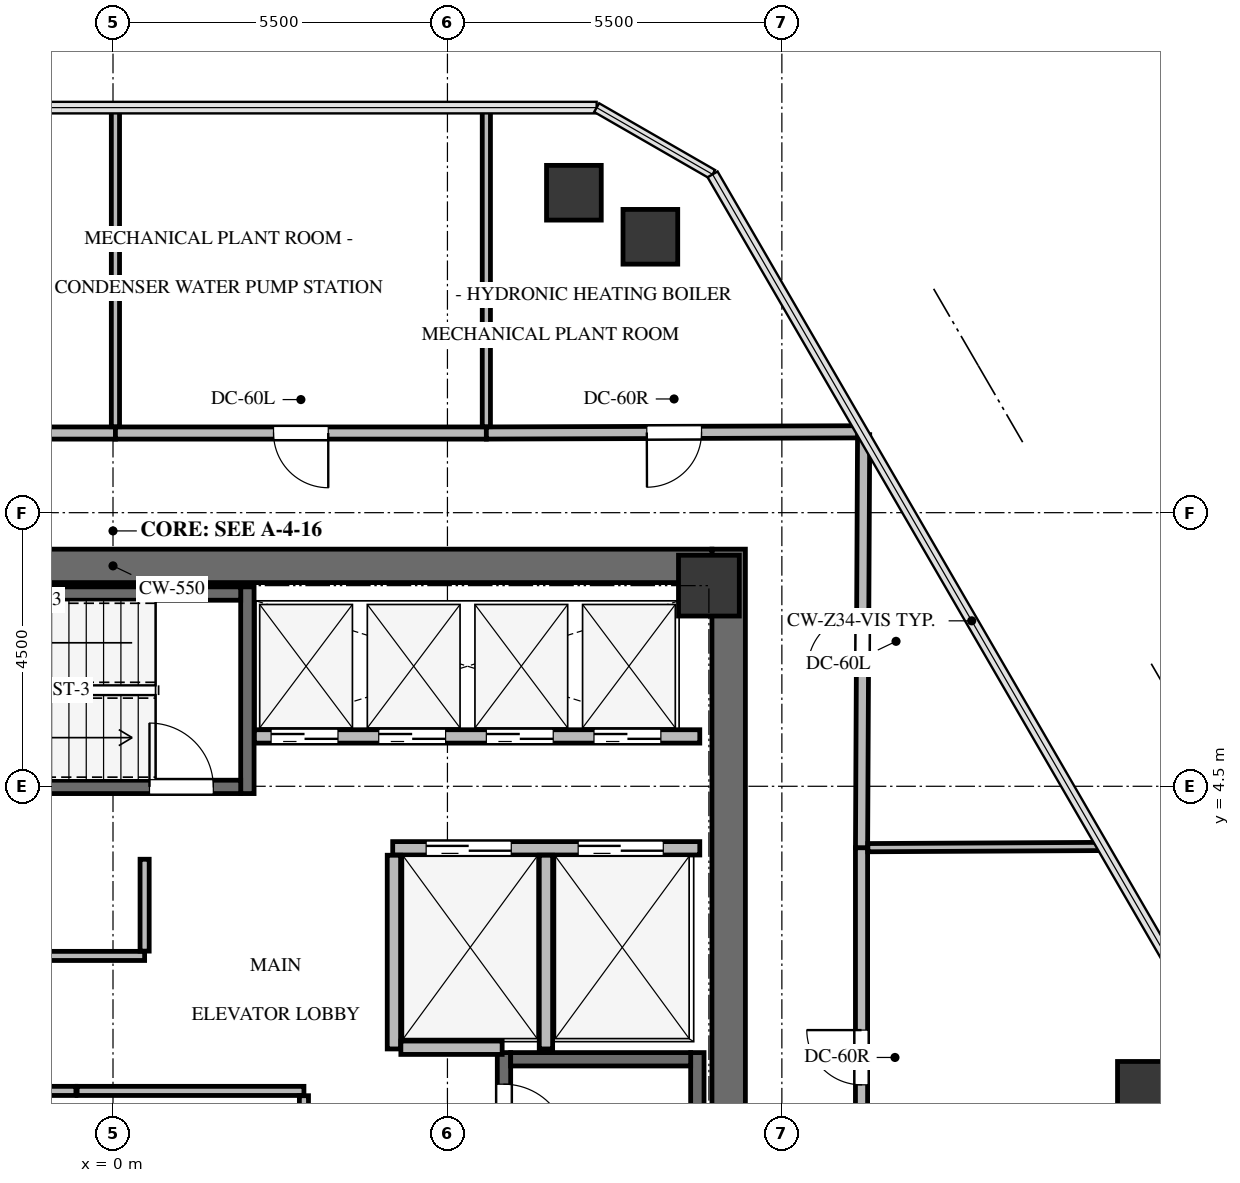
"""IFC4 building model, lengths in metres.
Left out: names, types, materials, properties, quantities, classifications, styles, units other than length and angle.
Written with IfcOpenShell. Run it as: python <this file> out.ifc"""

import sys

from ifc_helpers import new_model, si_unit, direction, frame, frame_2d, origin, origin_2d, place, context, subcontext, project, spatial, rectangle, extrude, source, transform, mapped, element, fill, save


model = new_model("IFC4")
c1 = context("Model", 3, precision=1e-05, world=origin(), true_north=direction((0.0, 1.0)))
c2 = subcontext(c1, "Body", "Model", "MODEL_VIEW")
j1 = project(units=[si_unit("LENGTHUNIT", "METRE"), si_unit("PLANEANGLEUNIT", "RADIAN")], contexts=[c1])
p1 = place(None, origin())
s1 = spatial("IfcSite", under=j1, at=p1, CompositionType="ELEMENT")
p2 = place(p1, origin())
s2 = spatial("IfcBuilding", under=s1, at=p2, CompositionType="ELEMENT")
p3 = place(p2, frame((0.0, 0.0, 264.9)))
s3 = spatial("IfcBuildingStorey", under=s2, at=p3, CompositionType="ELEMENT", Elevation=264.9)
p4 = place(p3, frame((10.125, -8.4, 0.0), z_axis=(0.0, 0.0, 1.0), x_axis=(0.0, 1.0, 0.0)))
e1 = element("IfcWall", 1, at=p4, inside=s3, PredefinedType="SHEAR", context=c2, shape_type="SweptSolid", body=[
    extrude(rectangle(XDim=16.8, YDim=0.55, at=frame_2d((8.4, 0.0))), origin(), (0.0, 0.0, 1.0), 3.4),
])
p5 = place(p3, frame((-9.85, 8.125, 0.0), z_axis=(0.0, 0.0, 1.0), x_axis=(1.0, 0.0, 0.0)))
e2 = element("IfcWall", 2, at=p5, inside=s3, PredefinedType="SHEAR", context=c2, shape_type="SweptSolid", body=[
    extrude(rectangle(XDim=19.7, YDim=0.55, at=frame_2d((9.85, 0.0))), origin(), (0.0, 0.0, 1.0), 3.4),
])
p6 = place(p3, frame((9.61, -7.77, -0.3), z_axis=(0.0, 0.0, 1.0), x_axis=(0.0, 1.0, 0.0)))
e3 = element("IfcWall", 3, at=p6, inside=s3, PredefinedType="SHEAR", context=c2, shape_type="SweptSolid", body=[
    extrude(rectangle(XDim=7.89, YDim=0.22, at=frame_2d((3.945, 0.0))), origin(), (0.0, 0.0, 1.0), 3.4),
])
p7 = place(p3, frame((6.43, 0.12, -0.3), z_axis=(0.0, 0.0, 1.0), x_axis=(0.0, -1.0, 0.0)))
e4 = element("IfcWall", 4, at=p7, inside=s3, PredefinedType="SHEAR", context=c2, shape_type="SweptSolid", body=[
    extrude(rectangle(XDim=7.89, YDim=0.22, at=frame_2d((3.945, 0.0))), origin(), (0.0, 0.0, 1.0), 3.4),
])
p8 = place(p7, frame((0.52, 0.0, 0.0)))
e5 = element("IfcOpeningElement", 5, at=p8, cuts=e4, PredefinedType="OPENING", context=c2, shape_type="SweptSolid", body=[
    extrude(rectangle(XDim=1.05, YDim=2.15, at=frame_2d((0.525, 1.075))), frame((0.0, 0.12, 0.0), z_axis=(0.0, -1.0, 0.0), x_axis=(1.0, 0.0, 0.0)), (0.0, 0.0, 1.0), 0.24),
])
p9 = place(p3, frame((9.5, 0.01, -0.3), z_axis=(0.0, 0.0, 1.0), x_axis=(-1.0, 0.0, 0.0)))
e6 = element("IfcWall", 6, at=p9, inside=s3, PredefinedType="SHEAR", context=c2, shape_type="SweptSolid", body=[
    extrude(rectangle(XDim=2.96, YDim=0.22, at=frame_2d((1.48, 0.0))), origin(), (0.0, 0.0, 1.0), 3.4),
])
p10 = place(p3, frame((2.21, 4.38, -0.3), z_axis=(0.0, 0.0, 1.0), x_axis=(0.0, 1.0, 0.0)))
e7 = element("IfcWall", 7, at=p10, inside=s3, PredefinedType="SHEAR", context=c2, shape_type="SweptSolid", body=[
    extrude(rectangle(XDim=3.4, YDim=0.22, at=frame_2d((1.7, 0.0))), origin(), (0.0, 0.0, 1.0), 3.4),
])
p11 = place(p3, frame((-5.25, 4.49, -0.3), z_axis=(0.0, 0.0, 1.0), x_axis=(1.0, 0.0, 0.0)))
e8 = element("IfcWall", 8, at=p11, inside=s3, PredefinedType="SHEAR", context=c2, shape_type="SweptSolid", body=[
    extrude(rectangle(XDim=7.35, YDim=0.22, at=frame_2d((3.675, 0.0))), origin(), (0.0, 0.0, 1.0), 3.4),
])
p12 = place(p11, frame((5.85, 0.0, 0.0)))
e9 = element("IfcOpeningElement", 9, at=p12, cuts=e8, PredefinedType="OPENING", context=c2, shape_type="SweptSolid", body=[
    extrude(rectangle(XDim=1.05, YDim=2.15, at=frame_2d((0.525, 1.075))), frame((0.0, 0.12, 0.0), z_axis=(0.0, -1.0, 0.0), x_axis=(1.0, 0.0, 0.0)), (0.0, 0.0, 1.0), 0.24),
])
p13 = place(p3, frame((2.1, 7.67, -0.3), z_axis=(0.0, 0.0, 1.0), x_axis=(-1.0, 0.0, 0.0)))
e10 = element("IfcWall", 10, at=p13, inside=s3, PredefinedType="SHEAR", context=c2, shape_type="SweptSolid", body=[
    extrude(rectangle(XDim=7.35, YDim=0.22, at=frame_2d((3.675, 0.0))), origin(), (0.0, 0.0, 1.0), 3.4),
])
m1 = source(origin(), c2, "Body", "SweptSolid", [
    extrude(rectangle(XDim=1.0, YDim=1.0, at=origin_2d()), origin(), (0.0, 0.0, 1.0), 3.4),
])
p14 = place(p3, frame((9.8, 7.8, -0.3), z_axis=(0.0, 0.0, 1.0), x_axis=(1.0, 0.0, 0.0)))
e11 = element("IfcColumn", 11, at=p14, inside=s3, PredefinedType="COLUMN", context=c2, shape_type="MappedRepresentation", body=[
    mapped(m1, transform((0.0, 0.0, 0.0), x_axis=(1.0, 0.0, 0.0), y_axis=(0.0, 1.0, 0.0), z_axis=(0.0, 0.0, 1.0), scale=1.0)),
])
m2 = source(origin(), c2, "Body", "SweptSolid", [
    extrude(rectangle(XDim=0.9, YDim=0.9, at=origin_2d()), origin(), (0.0, 0.0, 1.0), 3.4),
])
for number, where, z_axis, x_axis in (
    (12, (7.58, 14.262, -0.3), (0.0, 0.0, 1.0), (1.0, 0.0, 0.0)),
    (13, (8.837, 13.538, -0.3), (0.0, 0.0, 1.0), (1.0, 0.0, 0.0)),
    (14, (16.97, -0.476, -0.3), (0.0, 0.0, 1.0), (1.0, 0.0, 0.0)),
):
    element("IfcColumn", number, at=place(p3, frame(where, z_axis=z_axis, x_axis=x_axis)), inside=s3, PredefinedType="COLUMN", context=c2, shape_type="MappedRepresentation", body=[
        mapped(m2, transform((0.0, 0.0, 0.0), x_axis=(1.0, 0.0, 0.0), y_axis=(0.0, 1.0, 0.0), z_axis=(0.0, 0.0, 1.0), scale=1.0)),
    ])
p15 = place(p3, frame((4.6, 3.48, 0.0), z_axis=(0.0, 0.0, 1.0), x_axis=(1.0, 0.0, 0.0)))
e15 = element("IfcWall", 15, at=p15, inside=s3, PredefinedType="SOLIDWALL", context=c2, shape_type="SweptSolid", body=[
    extrude(rectangle(XDim=5.05, YDim=0.22, at=frame_2d((2.525, 0.0))), origin(), (0.0, 0.0, 1.0), 3.085),
])
p16 = place(p15, frame((0.55, 0.0, 0.0)))
e16 = element("IfcOpeningElement", 16, at=p16, cuts=e15, PredefinedType="OPENING", context=c2, shape_type="SweptSolid", body=[
    extrude(rectangle(XDim=1.4, YDim=2.15, at=frame_2d((0.7, 1.075))), frame((0.0, 0.12, 0.0), z_axis=(0.0, -1.0, 0.0), x_axis=(1.0, 0.0, 0.0)), (0.0, 0.0, 1.0), 0.24),
])
p17 = place(p15, frame((3.05, 0.0, 0.0)))
e17 = element("IfcOpeningElement", 17, at=p17, cuts=e15, PredefinedType="OPENING", context=c2, shape_type="SweptSolid", body=[
    extrude(rectangle(XDim=1.4, YDim=2.15, at=frame_2d((0.7, 1.075))), frame((0.0, 0.12, 0.0), z_axis=(0.0, -1.0, 0.0), x_axis=(1.0, 0.0, 0.0)), (0.0, 0.0, 1.0), 0.24),
])
for number, where, z_axis, x_axis in (
    (18, (4.62, 0.18, 0.0), (0.0, 0.0, 1.0), (0.0, 1.0, 0.0)),
    (19, (7.12, 0.18, 0.0), (0.0, 0.0, 1.0), (0.0, 1.0, 0.0)),
):
    element("IfcWall", number, at=place(p3, frame(where, z_axis=z_axis, x_axis=x_axis)), inside=s3, PredefinedType="SOLIDWALL", context=c2, shape_type="SweptSolid", body=[
        extrude(rectangle(XDim=3.186, YDim=0.22, at=frame_2d((1.593, 0.0))), origin(), (0.0, 0.0, 1.0), 3.085),
    ])
p18 = place(p3, frame((4.734, 0.2, 0.0), z_axis=(0.0, 0.0, 1.0), x_axis=(1.0, 0.0, 0.0)))
e20 = element("IfcWall", 20, at=p18, inside=s3, PredefinedType="SOLIDWALL", context=c2, shape_type="SweptSolid", body=[
    extrude(rectangle(XDim=1.666, YDim=0.22, at=frame_2d((0.833, 0.0))), origin(), (0.0, 0.0, 1.0), 3.085),
])
p19 = place(p3, frame((2.325, 5.32, 0.0), z_axis=(0.0, 0.0, 1.0), x_axis=(1.0, 0.0, 0.0)))
e21 = element("IfcWall", 21, at=p19, inside=s3, PredefinedType="SOLIDWALL", context=c2, shape_type="SweptSolid", body=[
    extrude(rectangle(XDim=7.325, YDim=0.22, at=frame_2d((3.663, 0.0))), origin(), (0.0, 0.0, 1.0), 3.085),
])
p20 = place(p19, frame((0.275, 0.0, 0.0)))
e22 = element("IfcOpeningElement", 22, at=p20, cuts=e21, PredefinedType="OPENING", context=c2, shape_type="SweptSolid", body=[
    extrude(rectangle(XDim=1.1, YDim=2.15, at=frame_2d((0.55, 1.075))), frame((0.0, 0.12, 0.0), z_axis=(0.0, -1.0, 0.0), x_axis=(1.0, 0.0, 0.0)), (0.0, 0.0, 1.0), 0.24),
])
p21 = place(p19, frame((2.045, 0.0, 0.0)))
e23 = element("IfcOpeningElement", 23, at=p21, cuts=e21, PredefinedType="OPENING", context=c2, shape_type="SweptSolid", body=[
    extrude(rectangle(XDim=1.1, YDim=2.15, at=frame_2d((0.55, 1.075))), frame((0.0, 0.12, 0.0), z_axis=(0.0, -1.0, 0.0), x_axis=(1.0, 0.0, 0.0)), (0.0, 0.0, 1.0), 0.24),
])
p22 = place(p19, frame((3.815, 0.0, 0.0)))
e24 = element("IfcOpeningElement", 24, at=p22, cuts=e21, PredefinedType="OPENING", context=c2, shape_type="SweptSolid", body=[
    extrude(rectangle(XDim=1.1, YDim=2.15, at=frame_2d((0.55, 1.075))), frame((0.0, 0.12, 0.0), z_axis=(0.0, -1.0, 0.0), x_axis=(1.0, 0.0, 0.0)), (0.0, 0.0, 1.0), 0.24),
])
p23 = place(p19, frame((5.585, 0.0, 0.0)))
e25 = element("IfcOpeningElement", 25, at=p23, cuts=e21, PredefinedType="OPENING", context=c2, shape_type="SweptSolid", body=[
    extrude(rectangle(XDim=1.1, YDim=2.15, at=frame_2d((0.55, 1.075))), frame((0.0, 0.12, 0.0), z_axis=(0.0, -1.0, 0.0), x_axis=(1.0, 0.0, 0.0)), (0.0, 0.0, 1.0), 0.24),
])
for number, where, z_axis, x_axis in (
    (26, (-4.34, -0.51, 0.0), (0.0, 0.0, 1.0), (1.0, 0.0, 0.0)),
    (27, (-0.59, -0.51, 0.0), (0.0, 0.0, 1.0), (1.0, 0.0, 0.0)),
):
    element("IfcWall", number, at=place(p3, frame(where, z_axis=z_axis, x_axis=x_axis)), inside=s3, PredefinedType="PARTITIONING", context=c2, shape_type="SweptSolid", body=[
        extrude(rectangle(XDim=3.73, YDim=0.15, at=frame_2d((1.865, 0.0))), origin(), (0.0, 0.0, 1.0), 3.085),
    ])
p24 = place(p3, frame((3.14, -0.589, 0.0), z_axis=(0.0, 0.0, 1.0), x_axis=(0.0, -1.0, 0.0)))
e28 = element("IfcWall", 28, at=p24, inside=s3, PredefinedType="PARTITIONING", context=c2, shape_type="SweptSolid", body=[
    extrude(rectangle(XDim=2.372, YDim=0.15, at=frame_2d((1.186, 0.0))), origin(), (0.0, 0.0, 1.0), 3.085),
])
p25 = place(p3, frame((0.52, 1.71, 0.0), z_axis=(0.0, 0.0, 1.0), x_axis=(-1.0, 0.0, 0.0)))
e29 = element("IfcWall", 29, at=p25, inside=s3, PredefinedType="PARTITIONING", context=c2, shape_type="SweptSolid", body=[
    extrude(rectangle(XDim=5.816, YDim=0.15, at=frame_2d((2.908, 0.0))), origin(), (0.0, 0.0, 1.0), 3.085),
])
p26 = place(p25, frame((2.458, 0.0, 0.0)))
e30 = element("IfcOpeningElement", 30, at=p26, cuts=e29, PredefinedType="OPENING", context=c2, shape_type="SweptSolid", body=[
    extrude(rectangle(XDim=0.9, YDim=2.05, at=frame_2d((0.45, 1.025))), frame((0.0, 0.085, 0.0), z_axis=(0.0, -1.0, 0.0), x_axis=(1.0, 0.0, 0.0)), (0.0, 0.0, 1.0), 0.17),
])
p27 = place(p3, frame((0.52, 3.3, 0.0), z_axis=(0.0, 0.0, 1.0), x_axis=(0.0, -1.0, 0.0)))
e31 = element("IfcWall", 31, at=p27, inside=s3, PredefinedType="PARTITIONING", context=c2, shape_type="SweptSolid", body=[
    extrude(rectangle(XDim=1.511, YDim=0.15, at=frame_2d((0.755, 0.0))), origin(), (0.0, 0.0, 1.0), 3.085),
])
p28 = place(p3, frame((0.04, 10.31, 0.0), z_axis=(0.0, 0.0, 1.0), x_axis=(-1.0, 0.0, 0.0)))
e32 = element("IfcWall", 32, at=p28, inside=s3, PredefinedType="SOLIDWALL", context=c2, shape_type="SweptSolid", body=[
    extrude(rectangle(XDim=6.1, YDim=0.2, at=frame_2d((3.05, 0.0))), origin(), (0.0, 0.0, 1.0), 2.648),
])
p29 = place(p28, frame((2.6, 0.0, 0.0)))
e33 = element("IfcOpeningElement", 33, at=p29, cuts=e32, PredefinedType="OPENING", context=c2, shape_type="SweptSolid", body=[
    extrude(rectangle(XDim=0.9, YDim=2.05, at=frame_2d((0.45, 1.025))), frame((0.0, 0.11, 0.0), z_axis=(0.0, -1.0, 0.0), x_axis=(1.0, 0.0, 0.0)), (0.0, 0.0, 1.0), 0.22),
])
p30 = place(p3, frame((6.14, 10.31, 0.0), z_axis=(0.0, 0.0, 1.0), x_axis=(-1.0, 0.0, 0.0)))
e34 = element("IfcWall", 34, at=p30, inside=s3, PredefinedType="SOLIDWALL", context=c2, shape_type="SweptSolid", body=[
    extrude(rectangle(XDim=6.1, YDim=0.2, at=frame_2d((3.05, 0.0))), origin(), (0.0, 0.0, 1.0), 2.648),
])
p31 = place(p30, frame((2.6, 0.0, 0.0)))
e35 = element("IfcOpeningElement", 35, at=p31, cuts=e34, PredefinedType="OPENING", context=c2, shape_type="SweptSolid", body=[
    extrude(rectangle(XDim=0.9, YDim=2.05, at=frame_2d((0.45, 1.025))), frame((0.0, 0.11, 0.0), z_axis=(0.0, -1.0, 0.0), x_axis=(1.0, 0.0, 0.0)), (0.0, 0.0, 1.0), 0.22),
])
p32 = place(p3, frame((12.318, 10.33, 0.0), z_axis=(0.0, 0.0, 1.0), x_axis=(-0.999994876599, -0.003201058528, 0.0)))
e36 = element("IfcWall", 36, at=p32, inside=s3, PredefinedType="SOLIDWALL", context=c2, shape_type="SweptSolid", body=[
    extrude(rectangle(XDim=6.178, YDim=0.2, at=frame_2d((3.089, 0.0))), origin(), (0.0, 0.0, 1.0), 2.342),
])
p33 = place(p32, frame((2.639, 0.0, 0.0)))
e37 = element("IfcOpeningElement", 37, at=p33, cuts=e36, PredefinedType="OPENING", context=c2, shape_type="SweptSolid", body=[
    extrude(rectangle(XDim=0.9, YDim=2.05, at=frame_2d((0.45, 1.025))), frame((0.0, 0.11, 0.0), z_axis=(0.0, -1.0, 0.0), x_axis=(1.0, 0.0, 0.0)), (0.0, 0.0, 1.0), 0.22),
])
p34 = place(p3, frame((12.31, -3.41, 0.0), z_axis=(0.0, 0.0, 1.0), x_axis=(0.0, 1.0, 0.0)))
e38 = element("IfcWall", 38, at=p34, inside=s3, PredefinedType="SOLIDWALL", context=c2, shape_type="SweptSolid", body=[
    extrude(rectangle(XDim=6.9, YDim=0.2, at=frame_2d((3.45, 0.0))), origin(), (0.0, 0.0, 1.0), 2.342),
])
p35 = place(p34, frame((3.0, 0.0, 0.0)))
e39 = element("IfcOpeningElement", 39, at=p35, cuts=e38, PredefinedType="OPENING", context=c2, shape_type="SweptSolid", body=[
    extrude(rectangle(XDim=0.9, YDim=2.05, at=frame_2d((0.45, 1.025))), frame((0.0, 0.11, 0.0), z_axis=(0.0, -1.0, 0.0), x_axis=(1.0, 0.0, 0.0)), (0.0, 0.0, 1.0), 0.22),
])
p36 = place(p3, frame((12.31, 3.49, 0.0), z_axis=(0.0, 0.0, 1.0), x_axis=(0.005031021246, 0.999987344333, 0.0)))
e40 = element("IfcWall", 40, at=p36, inside=s3, PredefinedType="SOLIDWALL", context=c2, shape_type="SweptSolid", body=[
    extrude(rectangle(XDim=6.794, YDim=0.2, at=frame_2d((3.397, 0.0))), origin(), (0.0, 0.0, 1.0), 2.439),
])
p37 = place(p36, frame((2.947, 0.0, 0.0)))
e41 = element("IfcOpeningElement", 41, at=p37, cuts=e40, PredefinedType="OPENING", context=c2, shape_type="SweptSolid", body=[
    extrude(rectangle(XDim=0.9, YDim=2.05, at=frame_2d((0.45, 1.025))), frame((0.0, 0.11, 0.0), z_axis=(0.0, -1.0, 0.0), x_axis=(1.0, 0.0, 0.0)), (0.0, 0.0, 1.0), 0.22),
])
p38 = place(p3, frame((0.04, 15.662, 0.0), z_axis=(0.0, 0.0, 1.0), x_axis=(0.0, -1.0, 0.0)))
e42 = element("IfcWall", 42, at=p38, inside=s3, PredefinedType="PARTITIONING", context=c2, shape_type="SweptSolid", body=[
    extrude(rectangle(XDim=5.248, YDim=0.135, at=frame_2d((2.624, 0.0))), origin(), (0.0, 0.0, 1.0), 2.439),
])
p39 = place(p3, frame((6.14, 15.662, 0.0), z_axis=(0.0, 0.0, 1.0), x_axis=(0.0, -1.0, 0.0)))
e43 = element("IfcWall", 43, at=p39, inside=s3, PredefinedType="PARTITIONING", context=c2, shape_type="SweptSolid", body=[
    extrude(rectangle(XDim=5.248, YDim=0.135, at=frame_2d((2.624, 0.0))), origin(), (0.0, 0.0, 1.0), 2.439),
])
p40 = place(p3, frame((12.414, 3.49, 0.0), z_axis=(0.0, 0.0, 1.0), x_axis=(0.999987207709, 0.005058104237, 0.0)))
e44 = element("IfcWall", 44, at=p40, inside=s3, PredefinedType="PARTITIONING", context=c2, shape_type="SweptSolid", body=[
    extrude(rectangle(XDim=3.861, YDim=0.135, at=frame_2d((1.931, 0.0))), origin(), (0.0, 0.0, 1.0), 2.439),
])
m3 = source(origin(), c2, "Body", "SweptSolid", [
    extrude(rectangle(XDim=1.05, YDim=2.15, at=frame_2d((0.525, 1.075))), frame((0.0, 0.025, 0.0), z_axis=(0.0, -1.0, 0.0), x_axis=(1.0, 0.0, 0.0)), (0.0, 0.0, 1.0), 0.05),
])
p41 = place(p8, origin())
e45 = element("IfcDoor", 45, at=p41, inside=s3, OperationType="SINGLE_SWING_RIGHT", PredefinedType="DOOR", context=c2, shape_type="MappedRepresentation", body=[
    mapped(m3, transform((0.0, 0.0, 0.0), x_axis=(1.0, 0.0, 0.0), y_axis=(0.0, 1.0, 0.0), z_axis=(0.0, 0.0, 1.0), scale=1.0)),
])
fill(e5, e45)
m4 = source(origin(), c2, "Body", "SweptSolid", [
    extrude(rectangle(XDim=1.05, YDim=2.15, at=frame_2d((0.525, 1.075))), frame((0.0, 0.025, 0.0), z_axis=(0.0, -1.0, 0.0), x_axis=(1.0, 0.0, 0.0)), (0.0, 0.0, 1.0), 0.05),
])
p42 = place(p12, origin())
e46 = element("IfcDoor", 46, at=p42, inside=s3, OperationType="SINGLE_SWING_LEFT", PredefinedType="DOOR", context=c2, shape_type="MappedRepresentation", body=[
    mapped(m4, transform((0.0, 0.0, 0.0), x_axis=(1.0, 0.0, 0.0), y_axis=(0.0, 1.0, 0.0), z_axis=(0.0, 0.0, 1.0), scale=1.0)),
])
fill(e9, e46)
m5 = source(origin(), c2, "Body", "SweptSolid", [
    extrude(rectangle(XDim=1.4, YDim=2.15, at=frame_2d((0.7, 1.075))), frame((0.0, 0.025, 0.0), z_axis=(0.0, -1.0, 0.0), x_axis=(1.0, 0.0, 0.0)), (0.0, 0.0, 1.0), 0.05),
])
p43 = place(p16, origin())
e47 = element("IfcDoor", 47, at=p43, inside=s3, OperationType="DOUBLE_DOOR_SLIDING", PredefinedType="DOOR", context=c2, shape_type="MappedRepresentation", body=[
    mapped(m5, transform((0.0, 0.0, 0.0), x_axis=(1.0, 0.0, 0.0), y_axis=(0.0, 1.0, 0.0), z_axis=(0.0, 0.0, 1.0), scale=1.0)),
])
fill(e16, e47)
p44 = place(p17, origin())
e48 = element("IfcDoor", 48, at=p44, inside=s3, OperationType="DOUBLE_DOOR_SLIDING", PredefinedType="DOOR", context=c2, shape_type="MappedRepresentation", body=[
    mapped(m5, transform((0.0, 0.0, 0.0), x_axis=(1.0, 0.0, 0.0), y_axis=(0.0, 1.0, 0.0), z_axis=(0.0, 0.0, 1.0), scale=1.0)),
])
fill(e17, e48)
m6 = source(origin(), c2, "Body", "SweptSolid", [
    extrude(rectangle(XDim=1.1, YDim=2.15, at=frame_2d((0.55, 1.075))), frame((0.0, 0.025, 0.0), z_axis=(0.0, -1.0, 0.0), x_axis=(1.0, 0.0, 0.0)), (0.0, 0.0, 1.0), 0.05),
])
p45 = place(p20, origin())
e49 = element("IfcDoor", 49, at=p45, inside=s3, OperationType="DOUBLE_DOOR_SLIDING", PredefinedType="DOOR", context=c2, shape_type="MappedRepresentation", body=[
    mapped(m6, transform((0.0, 0.0, 0.0), x_axis=(1.0, 0.0, 0.0), y_axis=(0.0, 1.0, 0.0), z_axis=(0.0, 0.0, 1.0), scale=1.0)),
])
fill(e22, e49)
p46 = place(p21, origin())
e50 = element("IfcDoor", 50, at=p46, inside=s3, OperationType="DOUBLE_DOOR_SLIDING", PredefinedType="DOOR", context=c2, shape_type="MappedRepresentation", body=[
    mapped(m6, transform((0.0, 0.0, 0.0), x_axis=(1.0, 0.0, 0.0), y_axis=(0.0, 1.0, 0.0), z_axis=(0.0, 0.0, 1.0), scale=1.0)),
])
fill(e23, e50)
p47 = place(p22, origin())
e51 = element("IfcDoor", 51, at=p47, inside=s3, OperationType="DOUBLE_DOOR_SLIDING", PredefinedType="DOOR", context=c2, shape_type="MappedRepresentation", body=[
    mapped(m6, transform((0.0, 0.0, 0.0), x_axis=(1.0, 0.0, 0.0), y_axis=(0.0, 1.0, 0.0), z_axis=(0.0, 0.0, 1.0), scale=1.0)),
])
fill(e24, e51)
p48 = place(p23, origin())
e52 = element("IfcDoor", 52, at=p48, inside=s3, OperationType="DOUBLE_DOOR_SLIDING", PredefinedType="DOOR", context=c2, shape_type="MappedRepresentation", body=[
    mapped(m6, transform((0.0, 0.0, 0.0), x_axis=(1.0, 0.0, 0.0), y_axis=(0.0, 1.0, 0.0), z_axis=(0.0, 0.0, 1.0), scale=1.0)),
])
fill(e25, e52)
m7 = source(origin(), c2, "Body", "SweptSolid", [
    extrude(rectangle(XDim=0.9, YDim=2.05, at=frame_2d((0.45, 1.025))), frame((0.0, 0.025, 0.0), z_axis=(0.0, -1.0, 0.0), x_axis=(1.0, 0.0, 0.0)), (0.0, 0.0, 1.0), 0.05),
])
p49 = place(p31, origin())
e53 = element("IfcDoor", 53, at=p49, inside=s3, OperationType="SINGLE_SWING_LEFT", PredefinedType="DOOR", context=c2, shape_type="MappedRepresentation", body=[
    mapped(m7, transform((0.0, 0.0, 0.0), x_axis=(1.0, 0.0, 0.0), y_axis=(0.0, 1.0, 0.0), z_axis=(0.0, 0.0, 1.0), scale=1.0)),
])
fill(e35, e53)
m8 = source(origin(), c2, "Body", "SweptSolid", [
    extrude(rectangle(XDim=0.9, YDim=2.05, at=frame_2d((0.45, 1.025))), frame((0.0, 0.025, 0.0), z_axis=(0.0, -1.0, 0.0), x_axis=(1.0, 0.0, 0.0)), (0.0, 0.0, 1.0), 0.05),
])
p50 = place(p33, origin())
e54 = element("IfcDoor", 54, at=p50, inside=s3, OperationType="SINGLE_SWING_RIGHT", PredefinedType="DOOR", context=c2, shape_type="MappedRepresentation", body=[
    mapped(m8, transform((0.0, 0.0, 0.0), x_axis=(1.0, 0.0, 0.0), y_axis=(0.0, 1.0, 0.0), z_axis=(0.0, 0.0, 1.0), scale=1.0)),
])
fill(e37, e54)
p51 = place(p35, origin())
e55 = element("IfcDoor", 55, at=p51, inside=s3, OperationType="SINGLE_SWING_RIGHT", PredefinedType="DOOR", context=c2, shape_type="MappedRepresentation", body=[
    mapped(m8, transform((0.0, 0.0, 0.0), x_axis=(1.0, 0.0, 0.0), y_axis=(0.0, 1.0, 0.0), z_axis=(0.0, 0.0, 1.0), scale=1.0)),
])
fill(e39, e55)
p52 = place(p37, origin())
e56 = element("IfcDoor", 56, at=p52, inside=s3, OperationType="SINGLE_SWING_LEFT", PredefinedType="DOOR", context=c2, shape_type="MappedRepresentation", body=[
    mapped(m7, transform((0.0, 0.0, 0.0), x_axis=(1.0, 0.0, 0.0), y_axis=(0.0, 1.0, 0.0), z_axis=(0.0, 0.0, 1.0), scale=1.0)),
])
fill(e41, e56)
save(model, sys.argv[1])
